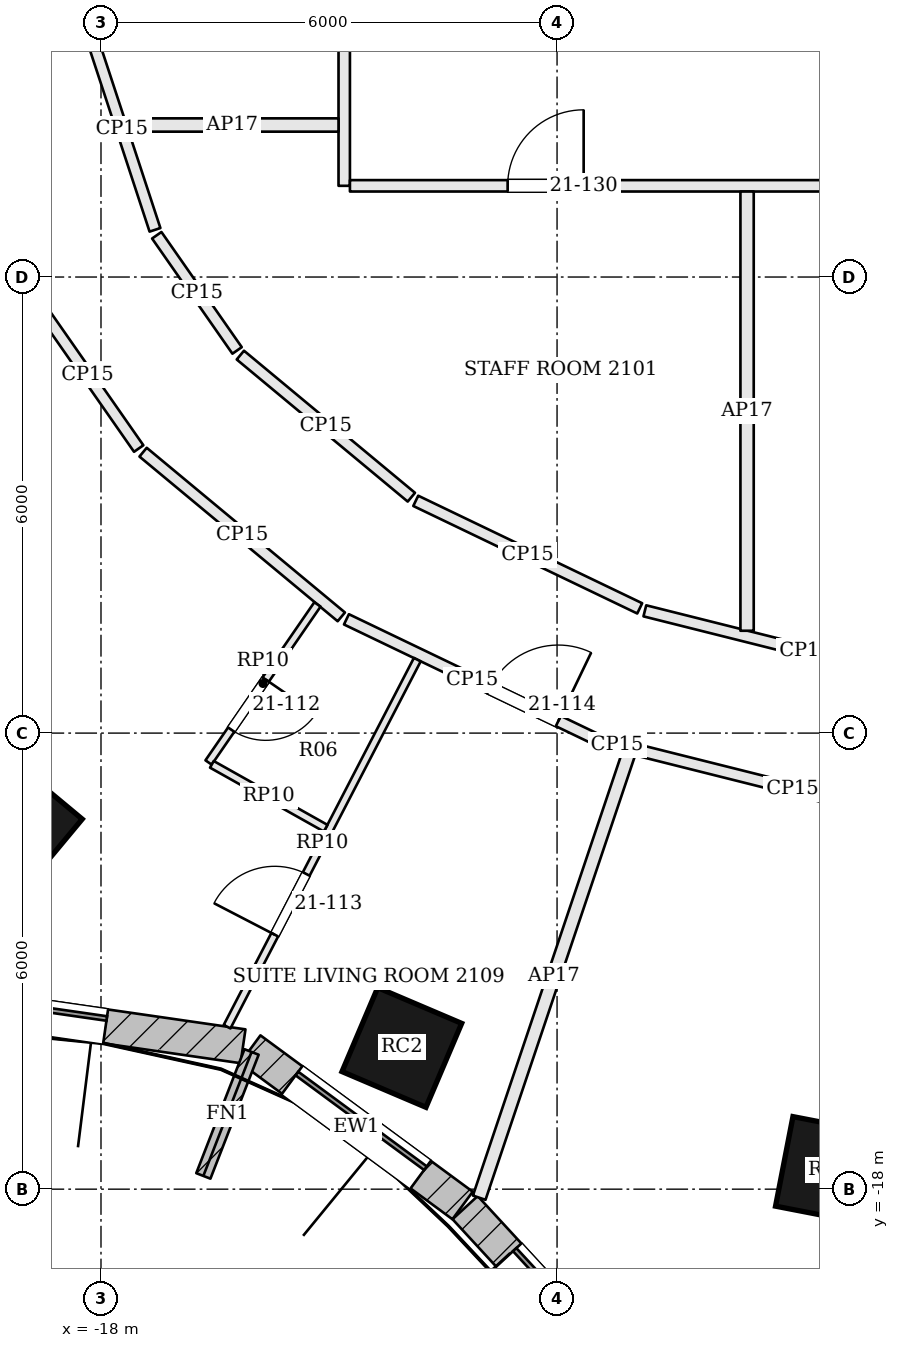
"""IFC4 building model, lengths in metres.
Left out: names, types, materials, properties, quantities, classifications, styles, units other than length and angle.
Written with IfcOpenShell. Run it as: python <this file> out.ifc"""

import sys

from ifc_helpers import new_model, si_unit, direction, frame, frame_2d, origin, origin_2d, place, context, subcontext, project, spatial, rectangle, extrude, element, fill, save


model = new_model("IFC4")
c1 = context("Model", 3, precision=1e-05, world=origin(), true_north=direction((0.0, 1.0)))
c2 = subcontext(c1, "Body", "Model", "MODEL_VIEW")
j1 = project(units=[si_unit("LENGTHUNIT", "METRE"), si_unit("PLANEANGLEUNIT", "RADIAN")], contexts=[c1])
p1 = place(None, origin())
s1 = spatial("IfcSite", under=j1, at=p1, CompositionType="ELEMENT")
p2 = place(p1, origin())
s2 = spatial("IfcBuilding", under=s1, at=p2, CompositionType="ELEMENT")
p3 = place(p2, frame((0.0, 0.0, 92.4)))
s3 = spatial("IfcBuildingStorey", under=s2, at=p3, CompositionType="ELEMENT", Elevation=92.4)
for number, where, z_axis, x_axis in (
    (1, (-19.092, -13.209, 0.0), (0.0, 0.0, 1.0), (0.769, -0.639, 0.0)),
    (2, (-14.042, -16.136, 0.0), (0.0, 0.0, 1.0), (0.92, -0.392, 0.0)),
    (3, (-8.422, -17.749, 0.0), (0.0, 0.0, 1.0), (0.982, -0.191, 0.0)),
):
    element("IfcColumn", number, at=place(p3, frame(where, z_axis=z_axis, x_axis=x_axis)), inside=s3, PredefinedType="COLUMN", context=c2, shape_type="SweptSolid", body=[
        extrude(rectangle(XDim=1.2, YDim=1.2, at=origin_2d()), origin(), (0.0, 0.0, 1.0), 3.6),
    ])
p4 = place(p3, frame((-21.825, -15.297, 0.0), z_axis=(0.0, 0.0, 1.0), x_axis=(0.98971474215, -0.143054986527, 0.0)))
e4 = element("IfcWall", 4, at=p4, inside=s3, PredefinedType="SOLIDWALL", context=c2, shape_type="SweptSolid", body=[
    extrude(rectangle(XDim=5.753, YDim=0.45, at=frame_2d((2.876, 0.0))), origin(), (0.0, 0.0, 1.0), 3.4),
])
p5 = place(p4, frame((1.826, 0.0, 0.9)))
e5 = element("IfcOpeningElement", 5, at=p5, cuts=e4, PredefinedType="OPENING", context=c2, shape_type="SweptSolid", body=[
    extrude(rectangle(XDim=2.1, YDim=2.0, at=frame_2d((1.05, 1.0))), frame((0.0, 0.235, 0.0), z_axis=(0.0, -1.0, 0.0), x_axis=(1.0, 0.0, 0.0)), (0.0, 0.0, 1.0), 0.47),
])
p6 = place(p3, frame((-16.036, -16.158, 0.0), z_axis=(0.0, 0.0, 1.0), x_axis=(0.805181432967, -0.593028549064, 0.0)))
e6 = element("IfcWall", 6, at=p6, inside=s3, PredefinedType="SOLIDWALL", context=c2, shape_type="SweptSolid", body=[
    extrude(rectangle(XDim=3.469, YDim=0.45, at=frame_2d((1.734, 0.0))), origin(), (0.0, 0.0, 1.0), 3.4),
])
p7 = place(p6, frame((0.684, 0.0, 0.9)))
e7 = element("IfcOpeningElement", 7, at=p7, cuts=e6, PredefinedType="OPENING", context=c2, shape_type="SweptSolid", body=[
    extrude(rectangle(XDim=2.1, YDim=2.0, at=frame_2d((1.05, 1.0))), frame((0.0, 0.235, 0.0), z_axis=(0.0, -1.0, 0.0), x_axis=(1.0, 0.0, 0.0)), (0.0, 0.0, 1.0), 0.47),
])
p8 = place(p3, frame((-13.209, -18.243, 0.0), z_axis=(0.0, 0.0, 1.0), x_axis=(0.677612152497, -0.735419452278, 0.0)))
e8 = element("IfcWall", 8, at=p8, inside=s3, PredefinedType="SOLIDWALL", context=c2, shape_type="SweptSolid", body=[
    extrude(rectangle(XDim=3.797, YDim=0.45, at=frame_2d((1.898, 0.0))), origin(), (0.0, 0.0, 1.0), 3.4),
])
p9 = place(p8, frame((0.848, 0.0, 0.9)))
e9 = element("IfcOpeningElement", 9, at=p9, cuts=e8, PredefinedType="OPENING", context=c2, shape_type="SweptSolid", body=[
    extrude(rectangle(XDim=2.1, YDim=2.0, at=frame_2d((1.05, 1.0))), frame((0.0, 0.235, 0.0), z_axis=(0.0, -1.0, 0.0), x_axis=(1.0, 0.0, 0.0)), (0.0, 0.0, 1.0), 0.47),
])
p10 = place(p3, frame((-16.019, -16.195, 0.0), z_axis=(0.0, 0.0, 1.0), x_axis=(-0.362641522028, -0.931928713208, 0.0)))
e10 = element("IfcWall", 10, at=p10, inside=s3, PredefinedType="SOLIDWALL", context=c2, shape_type="SweptSolid", body=[
    extrude(rectangle(XDim=1.75, YDim=0.2, at=frame_2d((0.875, 0.0))), origin(), (0.0, 0.0, 1.0), 3.4),
])
p11 = place(p3, frame((-18.851, -6.325, 0.0), z_axis=(0.0, 0.0, 1.0), x_axis=(0.572090775968, -0.820190309656, 0.0)))
e11 = element("IfcWall", 11, at=p11, inside=s3, PredefinedType="PARTITIONING", context=c2, shape_type="SweptSolid", body=[
    extrude(rectangle(XDim=2.355, YDim=0.15, at=frame_2d((1.177, 0.0))), origin(), (0.0, 0.0, 1.0), 2.784),
])
p12 = place(p3, frame((-17.446, -8.304, 0.0), z_axis=(0.0, 0.0, 1.0), x_axis=(0.769200174495, -0.639007896318, 0.0)))
e12 = element("IfcWall", 12, at=p12, inside=s3, PredefinedType="PARTITIONING", context=c2, shape_type="SweptSolid", body=[
    extrude(rectangle(XDim=3.39, YDim=0.15, at=frame_2d((1.695, 0.0))), origin(), (0.0, 0.0, 1.0), 2.784),
])
p13 = place(p3, frame((-14.771, -10.503, 0.0), z_axis=(0.0, 0.0, 1.0), x_axis=(0.901503349553, -0.432772123346, 0.0)))
e13 = element("IfcWall", 13, at=p13, inside=s3, PredefinedType="PARTITIONING", context=c2, shape_type="SweptSolid", body=[
    extrude(rectangle(XDim=3.673, YDim=0.15, at=frame_2d((1.836, 0.0))), origin(), (0.0, 0.0, 1.0), 2.784),
])
p14 = place(p13, frame((2.092, 0.0, 0.0)))
e14 = element("IfcOpeningElement", 14, at=p14, cuts=e13, PredefinedType="OPENING", context=c2, shape_type="SweptSolid", body=[
    extrude(rectangle(XDim=1.0, YDim=2.1, at=frame_2d((0.5, 1.05))), frame((0.0, 0.085, 0.0), z_axis=(0.0, -1.0, 0.0), x_axis=(1.0, 0.0, 0.0)), (0.0, 0.0, 1.0), 0.17),
])
p15 = place(p3, frame((-11.387, -12.111, 0.0), z_axis=(0.0, 0.0, 1.0), x_axis=(0.969945028314, -0.243324150157, 0.0)))
e15 = element("IfcWall", 15, at=p15, inside=s3, PredefinedType="PARTITIONING", context=c2, shape_type="SweptSolid", body=[
    extrude(rectangle(XDim=0.364, YDim=0.15, at=frame_2d((0.182, 0.0))), origin(), (0.0, 0.0, 1.0), 2.784),
])
p16 = place(p3, frame((-13.024, -18.112, 0.0), z_axis=(0.0, 0.0, 1.0), x_axis=(0.319078434674, 0.947728311556, 0.0)))
e16 = element("IfcWall", 16, at=p16, inside=s3, PredefinedType="PARTITIONING", context=c2, shape_type="SweptSolid", body=[
    extrude(rectangle(XDim=6.163, YDim=0.175, at=frame_2d((3.082, 0.0))), origin(), (0.0, 0.0, 1.0), 2.784),
])
p17 = place(p3, frame((-10.961, -12.218, 0.0), z_axis=(0.0, 0.0, 1.0), x_axis=(0.969990045386, -0.243144631551, 0.0)))
e17 = element("IfcWall", 17, at=p17, inside=s3, PredefinedType="PARTITIONING", context=c2, shape_type="SweptSolid", body=[
    extrude(rectangle(XDim=4.244, YDim=0.15, at=frame_2d((2.122, 0.0))), origin(), (0.0, 0.0, 1.0), 2.784),
])
p18 = place(p3, frame((-6.617, -11.451, 0.0), z_axis=(0.0, 0.0, 1.0), x_axis=(-0.969987441267, 0.243155020069, 0.0)))
e18 = element("IfcWall", 18, at=p18, inside=s3, PredefinedType="PARTITIONING", context=c2, shape_type="SweptSolid", body=[
    extrude(rectangle(XDim=4.359, YDim=0.15, at=frame_2d((2.179, 0.0))), origin(), (0.0, 0.0, 1.0), 2.784),
])
p19 = place(p3, frame((-10.913, -10.359, 0.0), z_axis=(0.0, 0.0, 1.0), x_axis=(-0.90149741277, 0.432784489982, 0.0)))
e19 = element("IfcWall", 19, at=p19, inside=s3, PredefinedType="PARTITIONING", context=c2, shape_type="SweptSolid", body=[
    extrude(rectangle(XDim=3.269, YDim=0.15, at=frame_2d((1.634, 0.0))), origin(), (0.0, 0.0, 1.0), 2.784),
])
p20 = place(p3, frame((-13.917, -8.896, 0.0), z_axis=(0.0, 0.0, 1.0), x_axis=(-0.769130409479, 0.639091866021, 0.0)))
e20 = element("IfcWall", 20, at=p20, inside=s3, PredefinedType="PARTITIONING", context=c2, shape_type="SweptSolid", body=[
    extrude(rectangle(XDim=2.925, YDim=0.15, at=frame_2d((1.462, 0.0))), origin(), (0.0, 0.0, 1.0), 2.784),
])
p21 = place(p3, frame((-16.209, -6.966, 0.0), z_axis=(0.0, 0.0, 1.0), x_axis=(-0.572051367607, 0.820217795966, 0.0)))
e21 = element("IfcWall", 21, at=p21, inside=s3, PredefinedType="PARTITIONING", context=c2, shape_type="SweptSolid", body=[
    extrude(rectangle(XDim=1.848, YDim=0.15, at=frame_2d((0.924, 0.0))), origin(), (0.0, 0.0, 1.0), 2.784),
])
p22 = place(p3, frame((-17.29, -5.379, 0.0), z_axis=(0.0, 0.0, 1.0), x_axis=(-0.312009486843, 0.950078986253, 0.0)))
e22 = element("IfcWall", 22, at=p22, inside=s3, PredefinedType="PARTITIONING", context=c2, shape_type="SweptSolid", body=[
    extrude(rectangle(XDim=2.78, YDim=0.15, at=frame_2d((1.39, 0.0))), origin(), (0.0, 0.0, 1.0), 2.784),
])
p23 = place(p3, frame((-14.8, 8.148, 0.0), z_axis=(0.0, 0.0, 1.0), x_axis=(0.0, -1.0, 0.0)))
e23 = element("IfcWall", 23, at=p23, inside=s3, PredefinedType="PARTITIONING", context=c2, shape_type="SweptSolid", body=[
    extrude(rectangle(XDim=12.948, YDim=0.15, at=frame_2d((6.474, 0.0))), origin(), (0.0, 0.0, 1.0), 2.784),
])
p24 = place(p23, frame((5.687, 0.0, 0.0)))
e24 = element("IfcOpeningElement", 24, at=p24, cuts=e23, PredefinedType="OPENING", context=c2, shape_type="SweptSolid", body=[
    extrude(rectangle(XDim=0.7, YDim=2.1, at=frame_2d((0.35, 1.05))), frame((0.0, 0.085, 0.0), z_axis=(0.0, -1.0, 0.0), x_axis=(1.0, 0.0, 0.0)), (0.0, 0.0, 1.0), 0.17),
])
p25 = place(p3, frame((-14.725, -4.8, 0.0), z_axis=(0.0, 0.0, 1.0), x_axis=(1.0, 0.0, 0.0)))
e25 = element("IfcWall", 25, at=p25, inside=s3, PredefinedType="PARTITIONING", context=c2, shape_type="SweptSolid", body=[
    extrude(rectangle(XDim=29.525, YDim=0.15, at=frame_2d((14.763, 0.0))), origin(), (0.0, 0.0, 1.0), 2.784),
])
p26 = place(p25, frame((2.075, 0.0, 0.0)))
e26 = element("IfcOpeningElement", 26, at=p26, cuts=e25, PredefinedType="OPENING", context=c2, shape_type="SweptSolid", body=[
    extrude(rectangle(XDim=1.0, YDim=2.1, at=frame_2d((0.5, 1.05))), frame((0.0, 0.085, 0.0), z_axis=(0.0, -1.0, 0.0), x_axis=(1.0, 0.0, 0.0)), (0.0, 0.0, 1.0), 0.17),
])
p27 = place(p25, frame((13.825, 0.0, 0.0)))
e27 = element("IfcOpeningElement", 27, at=p27, cuts=e25, PredefinedType="OPENING", context=c2, shape_type="SweptSolid", body=[
    extrude(rectangle(XDim=1.8, YDim=2.1, at=frame_2d((0.9, 1.05))), frame((0.0, 0.085, 0.0), z_axis=(0.0, -1.0, 0.0), x_axis=(1.0, 0.0, 0.0)), (0.0, 0.0, 1.0), 0.17),
])
p28 = place(p25, frame((26.525, 0.0, 0.0)))
e28 = element("IfcOpeningElement", 28, at=p28, cuts=e25, PredefinedType="OPENING", context=c2, shape_type="SweptSolid", body=[
    extrude(rectangle(XDim=0.7, YDim=2.1, at=frame_2d((0.35, 1.05))), frame((0.0, 0.085, 0.0), z_axis=(0.0, -1.0, 0.0), x_axis=(1.0, 0.0, 0.0)), (0.0, 0.0, 1.0), 0.17),
])
p29 = place(p3, frame((-16.341, -15.862, 0.0), z_axis=(0.0, 0.0, 1.0), x_axis=(0.460149427678, 0.887841485969, 0.0)))
e29 = element("IfcWall", 29, at=p29, inside=s3, PredefinedType="PARTITIONING", context=c2, shape_type="SweptSolid", body=[
    extrude(rectangle(XDim=5.438, YDim=0.1, at=frame_2d((2.719, 0.0))), origin(), (0.0, 0.0, 1.0), 2.884),
])
p30 = place(p29, frame((1.363, 0.0, 0.0)))
e30 = element("IfcOpeningElement", 30, at=p30, cuts=e29, PredefinedType="OPENING", context=c2, shape_type="SweptSolid", body=[
    extrude(rectangle(XDim=0.9, YDim=2.4, at=frame_2d((0.45, 1.2))), frame((0.0, 0.06, 0.0), z_axis=(0.0, -1.0, 0.0), x_axis=(1.0, 0.0, 0.0)), (0.0, 0.0, 1.0), 0.12),
])
p31 = place(p3, frame((-15.152, -10.307, 0.0), z_axis=(0.0, 0.0, 1.0), x_axis=(-0.567242581317, -0.823550759784, 0.0)))
e31 = element("IfcWall", 31, at=p31, inside=s3, PredefinedType="PARTITIONING", context=c2, shape_type="SweptSolid", body=[
    extrude(rectangle(XDim=2.525, YDim=0.1, at=frame_2d((1.263, 0.0))), origin(), (0.0, 0.0, 1.0), 2.884),
])
p32 = place(p31, frame((1.2, 0.0, 0.0)))
e32 = element("IfcOpeningElement", 32, at=p32, cuts=e31, PredefinedType="OPENING", context=c2, shape_type="SweptSolid", body=[
    extrude(rectangle(XDim=0.8, YDim=2.1, at=frame_2d((0.4, 1.05))), frame((0.0, 0.06, 0.0), z_axis=(0.0, -1.0, 0.0), x_axis=(1.0, 0.0, 0.0)), (0.0, 0.0, 1.0), 0.12),
])
p33 = place(p3, frame((-16.541, -12.411, 0.0), z_axis=(0.0, 0.0, 1.0), x_axis=(0.872042364088, -0.489430398765, 0.0)))
e33 = element("IfcWall", 33, at=p33, inside=s3, PredefinedType="PARTITIONING", context=c2, shape_type="SweptSolid", body=[
    extrude(rectangle(XDim=1.717, YDim=0.1, at=frame_2d((0.858, 0.0))), origin(), (0.0, 0.0, 1.0), 2.884),
])
p34 = place(p3, frame((-9.5, -10.654, 0.0), z_axis=(0.0, 0.0, 1.0), x_axis=(0.0, 1.0, 0.0)))
e34 = element("IfcWall", 34, at=p34, inside=s3, PredefinedType="PARTITIONING", context=c2, shape_type="SweptSolid", body=[
    extrude(rectangle(XDim=5.779, YDim=0.175, at=frame_2d((2.889, 0.0))), origin(), (0.0, 0.0, 1.0), 2.784),
])
p35 = place(p3, frame((-17.668, -4.0, 0.0), z_axis=(0.0, 0.0, 1.0), x_axis=(1.0, 0.0, 0.0)))
e35 = element("IfcWall", 35, at=p35, inside=s3, PredefinedType="PARTITIONING", context=c2, shape_type="SweptSolid", body=[
    extrude(rectangle(XDim=2.793, YDim=0.175, at=frame_2d((1.396, 0.0))), origin(), (0.0, 0.0, 1.0), 2.784),
])
p36 = place(p5, origin())
e36 = element("IfcWindow", 36, at=p36, inside=s3, PartitioningType="SINGLE_PANEL", PredefinedType="WINDOW", context=c2, shape_type="SweptSolid", body=[
    extrude(rectangle(XDim=2.1, YDim=2.0, at=frame_2d((1.05, 1.0))), frame((0.0, 0.135, 0.0), z_axis=(0.0, -1.0, 0.0), x_axis=(1.0, 0.0, 0.0)), (0.0, 0.0, 1.0), 0.06),
])
fill(e5, e36)
p37 = place(p7, origin())
e37 = element("IfcWindow", 37, at=p37, inside=s3, PartitioningType="SINGLE_PANEL", PredefinedType="WINDOW", context=c2, shape_type="SweptSolid", body=[
    extrude(rectangle(XDim=2.1, YDim=2.0, at=frame_2d((1.05, 1.0))), frame((0.0, 0.135, 0.0), z_axis=(0.0, -1.0, 0.0), x_axis=(1.0, 0.0, 0.0)), (0.0, 0.0, 1.0), 0.06),
])
fill(e7, e37)
p38 = place(p9, origin())
e38 = element("IfcWindow", 38, at=p38, inside=s3, PartitioningType="SINGLE_PANEL", PredefinedType="WINDOW", context=c2, shape_type="SweptSolid", body=[
    extrude(rectangle(XDim=2.1, YDim=2.0, at=frame_2d((1.05, 1.0))), frame((0.0, 0.135, 0.0), z_axis=(0.0, -1.0, 0.0), x_axis=(1.0, 0.0, 0.0)), (0.0, 0.0, 1.0), 0.06),
])
fill(e9, e38)
p39 = place(p32, origin())
e39 = element("IfcDoor", 39, at=p39, inside=s3, OperationType="SINGLE_SWING_LEFT", PredefinedType="DOOR", context=c2, shape_type="SweptSolid", body=[
    extrude(rectangle(XDim=0.8, YDim=2.1, at=frame_2d((0.4, 1.05))), frame((0.0, 0.025, 0.0), z_axis=(0.0, -1.0, 0.0), x_axis=(1.0, 0.0, 0.0)), (0.0, 0.0, 1.0), 0.05),
])
fill(e32, e39)
p40 = place(p30, origin())
e40 = element("IfcDoor", 40, at=p40, inside=s3, OperationType="SINGLE_SWING_LEFT", PredefinedType="DOOR", context=c2, shape_type="SweptSolid", body=[
    extrude(rectangle(XDim=0.9, YDim=2.4, at=frame_2d((0.45, 1.2))), frame((0.0, 0.025, 0.0), z_axis=(0.0, -1.0, 0.0), x_axis=(1.0, 0.0, 0.0)), (0.0, 0.0, 1.0), 0.05),
])
fill(e30, e40)
p41 = place(p14, origin())
e41 = element("IfcDoor", 41, at=p41, inside=s3, OperationType="SINGLE_SWING_RIGHT", PredefinedType="DOOR", context=c2, shape_type="SweptSolid", body=[
    extrude(rectangle(XDim=1.0, YDim=2.1, at=frame_2d((0.5, 1.05))), frame((0.0, 0.025, 0.0), z_axis=(0.0, -1.0, 0.0), x_axis=(1.0, 0.0, 0.0)), (0.0, 0.0, 1.0), 0.05),
])
fill(e14, e41)
p42 = place(p26, origin())
e42 = element("IfcDoor", 42, at=p42, inside=s3, OperationType="SINGLE_SWING_RIGHT", PredefinedType="DOOR", context=c2, shape_type="SweptSolid", body=[
    extrude(rectangle(XDim=1.0, YDim=2.1, at=frame_2d((0.5, 1.05))), frame((0.0, 0.025, 0.0), z_axis=(0.0, -1.0, 0.0), x_axis=(1.0, 0.0, 0.0)), (0.0, 0.0, 1.0), 0.05),
])
fill(e26, e42)
save(model, sys.argv[1])
